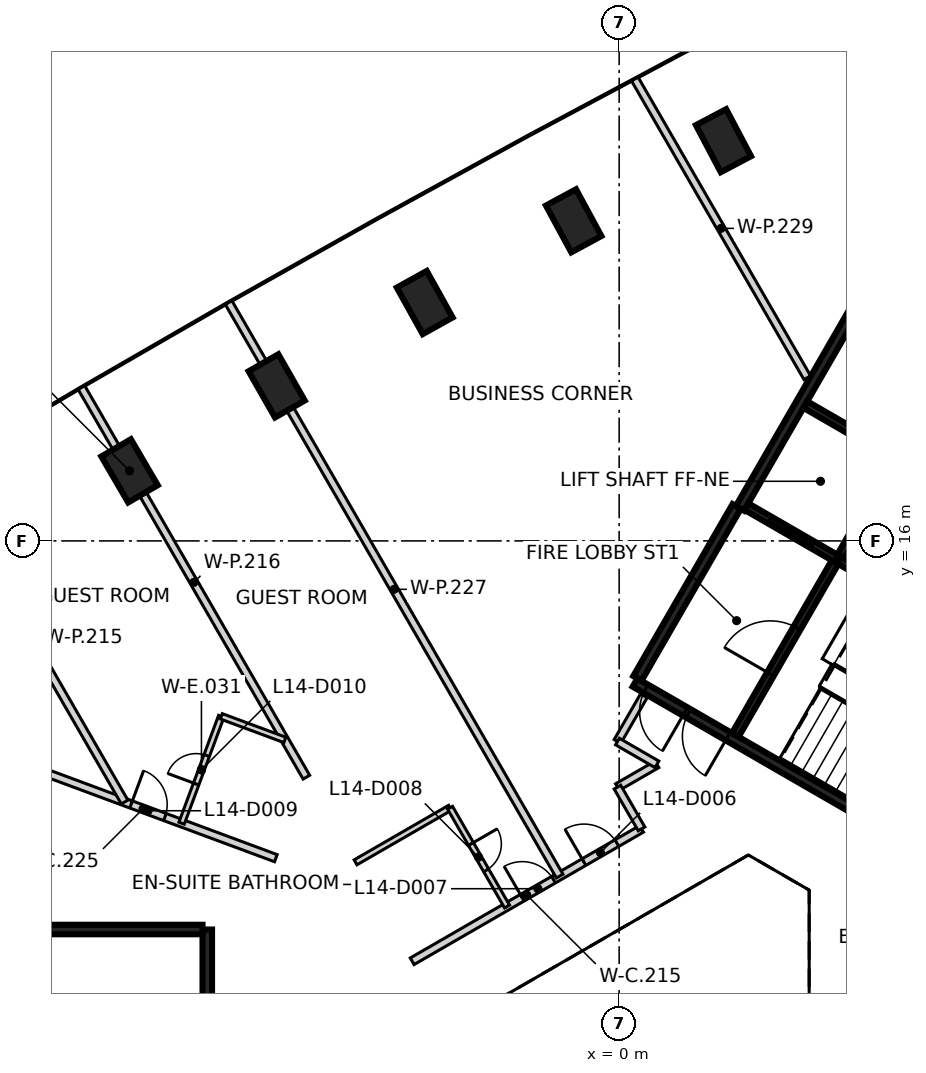
"""IFC4 building model, lengths in metres.
Left out: names, types, materials, properties, quantities, classifications, styles, units other than length and angle.
Written with IfcOpenShell. Run it as: python <this file> out.ifc"""

import sys

from ifc_helpers import new_model, si_unit, direction, frame, frame_2d, origin, origin_2d, place, context, subcontext, project, spatial, rectangle, extrude, element, fill, save


model = new_model("IFC4")
c1 = context("Model", 3, precision=1e-05, world=origin(), true_north=direction((0.0, 1.0)))
c2 = subcontext(c1, "Body", "Model", "MODEL_VIEW")
j1 = project(units=[si_unit("LENGTHUNIT", "METRE"), si_unit("PLANEANGLEUNIT", "RADIAN")], contexts=[c1])
p1 = place(None, origin())
s1 = spatial("IfcSite", under=j1, at=p1, CompositionType="ELEMENT")
p2 = place(p1, origin())
s2 = spatial("IfcBuilding", under=s1, at=p2, CompositionType="ELEMENT")
p3 = place(p2, frame((0.0, 0.0, 63.8)))
s3 = spatial("IfcBuildingStorey", under=s2, at=p3, CompositionType="ELEMENT", Elevation=63.8)
for number, where, z_axis, x_axis in (
    (1, (2.745, 26.531, -0.475), (0.0, 0.0, 1.0), (-0.467, 0.884, 0.0)),
    (2, (-1.197, 24.423, -0.475), (0.0, 0.0, 1.0), (-0.476, 0.879, 0.0)),
    (3, (-5.116, 22.272, -0.475), (0.0, 0.0, 1.0), (-0.486, 0.874, 0.0)),
    (4, (-9.011, 20.079, -0.475), (0.0, 0.0, 1.0), (-0.495, 0.869, 0.0)),
    (5, (-12.883, 17.844, -0.475), (0.0, 0.0, 1.0), (-0.505, 0.863, 0.0)),
):
    element("IfcColumn", number, at=place(p3, frame(where, z_axis=z_axis, x_axis=x_axis)), inside=s3, PredefinedType="COLUMN", context=c2, shape_type="SweptSolid", body=[
        extrude(rectangle(XDim=1.4, YDim=0.9, at=origin_2d()), origin(), (0.0, 0.0, 1.0), 3.6),
    ])
p4 = place(p3, frame((-10.837, 5.775, 0.0), z_axis=(0.0, 0.0, 1.0), x_axis=(0.0, -1.0, 0.0)))
e6 = element("IfcWall", 6, at=p4, inside=s3, PredefinedType="SHEAR", context=c2, shape_type="SweptSolid", body=[
    extrude(rectangle(XDim=11.55, YDim=0.25, at=frame_2d((5.775, 0.0))), origin(), (0.0, 0.0, 1.0), 3.125),
])
p5 = place(p4, frame((10.025, 0.0, 0.0)))
e7 = element("IfcOpeningElement", 7, at=p5, cuts=e6, PredefinedType="OPENING", context=c2, shape_type="SweptSolid", body=[
    extrude(rectangle(XDim=1.2, YDim=2.1, at=frame_2d((0.6, 1.05))), frame((0.0, 0.135, 0.0), z_axis=(0.0, -1.0, 0.0), x_axis=(1.0, 0.0, 0.0)), (0.0, 0.0, 1.0), 0.27),
])
p6 = place(p4, frame((8.725, 0.0, 0.0)))
e8 = element("IfcOpeningElement", 8, at=p6, cuts=e6, PredefinedType="OPENING", context=c2, shape_type="SweptSolid", body=[
    extrude(rectangle(XDim=1.2, YDim=2.1, at=frame_2d((0.6, 1.05))), frame((0.0, 0.135, 0.0), z_axis=(0.0, -1.0, 0.0), x_axis=(1.0, 0.0, 0.0)), (0.0, 0.0, 1.0), 0.27),
])
p7 = place(p3, frame((-16.472, 5.775, 0.0), z_axis=(0.0, 0.0, 1.0), x_axis=(1.0, 0.0, 0.0)))
e9 = element("IfcWall", 9, at=p7, inside=s3, PredefinedType="SHEAR", context=c2, shape_type="SweptSolid", body=[
    extrude(rectangle(XDim=5.51, YDim=0.25, at=frame_2d((2.755, 0.0))), origin(), (0.0, 0.0, 1.0), 3.125),
])
p8 = place(p3, frame((10.42, 6.498, 0.0), z_axis=(0.0, 0.0, 1.0), x_axis=(-0.866021906294, 0.500006057782, 0.0)))
e10 = element("IfcWall", 10, at=p8, inside=s3, PredefinedType="SHEAR", context=c2, shape_type="SweptSolid", body=[
    extrude(rectangle(XDim=11.55, YDim=0.25, at=frame_2d((5.775, 0.0))), origin(), (0.0, 0.0, 1.0), 3.125),
])
p9 = place(p8, frame((10.025, 0.0, 0.0)))
e11 = element("IfcOpeningElement", 11, at=p9, cuts=e10, PredefinedType="OPENING", context=c2, shape_type="SweptSolid", body=[
    extrude(rectangle(XDim=1.2, YDim=2.1, at=frame_2d((0.6, 1.05))), frame((0.0, 0.135, 0.0), z_axis=(0.0, -1.0, 0.0), x_axis=(1.0, 0.0, 0.0)), (0.0, 0.0, 1.0), 0.27),
])
p10 = place(p8, frame((8.725, 0.0, 0.0)))
e12 = element("IfcOpeningElement", 12, at=p10, cuts=e10, PredefinedType="OPENING", context=c2, shape_type="SweptSolid", body=[
    extrude(rectangle(XDim=1.2, YDim=2.1, at=frame_2d((0.6, 1.05))), frame((0.0, 0.135, 0.0), z_axis=(0.0, -1.0, 0.0), x_axis=(1.0, 0.0, 0.0)), (0.0, 0.0, 1.0), 0.27),
])
p11 = place(p3, frame((3.179, 16.856, 0.0), z_axis=(0.0, 0.0, 1.0), x_axis=(0.500004234368, 0.866022959057, 0.0)))
e13 = element("IfcWall", 13, at=p11, inside=s3, PredefinedType="SHEAR", context=c2, shape_type="SweptSolid", body=[
    extrude(rectangle(XDim=6.25, YDim=0.25, at=frame_2d((3.125, 0.0))), origin(), (0.0, 0.0, 1.0), 3.125),
])
p12 = place(p3, frame((0.48, 12.381, 0.0), z_axis=(0.0, 0.0, 1.0), x_axis=(0.49999885962, 0.866026062182, 0.0)))
e14 = element("IfcWall", 14, at=p12, inside=s3, PredefinedType="SHEAR", context=c2, shape_type="SweptSolid", body=[
    extrude(rectangle(XDim=5.225, YDim=0.25, at=frame_2d((2.612, 0.0))), origin(), (0.0, 0.0, 1.0), 3.125),
])
p13 = place(p3, frame((5.775, 15.502, 0.0), z_axis=(0.0, 0.0, 1.0), x_axis=(0.866020080793, -0.500009219579, 0.0)))
e15 = element("IfcWall", 15, at=p13, inside=s3, PredefinedType="SHEAR", context=c2, shape_type="SweptSolid", body=[
    extrude(rectangle(XDim=5.699, YDim=0.2, at=frame_2d((2.85, 0.0))), origin(), (0.0, 0.0, 1.0), 3.125),
])
p14 = place(p3, frame((3.057, 10.895, 0.0), z_axis=(0.0, 0.0, 1.0), x_axis=(0.499989418164, 0.866031513124, 0.0)))
e16 = element("IfcWall", 16, at=p14, inside=s3, PredefinedType="SHEAR", context=c2, shape_type="SweptSolid", body=[
    extrude(rectangle(XDim=5.251, YDim=0.2, at=frame_2d((2.625, 0.0))), origin(), (0.0, 0.0, 1.0), 3.125),
])
p15 = place(p14, frame((1.849, 0.0, 0.0)))
e17 = element("IfcOpeningElement", 17, at=p15, cuts=e16, PredefinedType="OPENING", context=c2, shape_type="SweptSolid", body=[
    extrude(rectangle(XDim=1.4, YDim=2.1, at=frame_2d((0.7, 1.05))), frame((0.0, 0.11, 0.0), z_axis=(0.0, -1.0, 0.0), x_axis=(1.0, 0.0, 0.0)), (0.0, 0.0, 1.0), 0.22),
])
p16 = place(p3, frame((7.199, 17.97, 0.0), z_axis=(0.0, 0.0, 1.0), x_axis=(-0.499968400327, -0.866043647095, 0.0)))
e18 = element("IfcWall", 18, at=p16, inside=s3, PredefinedType="SHEAR", context=c2, shape_type="SweptSolid", body=[
    extrude(rectangle(XDim=2.75, YDim=0.2, at=frame_2d((1.375, 0.0))), origin(), (0.0, 0.0, 1.0), 3.125),
])
p17 = place(p3, frame((5.725, 15.531, 0.0), z_axis=(0.0, 0.0, 1.0), x_axis=(-0.866037306777, 0.499979382845, 0.0)))
e19 = element("IfcWall", 19, at=p17, inside=s3, PredefinedType="SHEAR", context=c2, shape_type="SweptSolid", body=[
    extrude(rectangle(XDim=2.742, YDim=0.2, at=frame_2d((1.371, 0.0))), origin(), (0.0, 0.0, 1.0), 3.125),
])
p18 = place(p17, frame((0.743, 0.0, 0.0)))
e20 = element("IfcOpeningElement", 20, at=p18, cuts=e19, PredefinedType="OPENING", context=c2, shape_type="SweptSolid", body=[
    extrude(rectangle(XDim=1.3, YDim=2.1, at=frame_2d((0.65, 1.05))), frame((0.0, 0.11, 0.0), z_axis=(0.0, -1.0, 0.0), x_axis=(1.0, 0.0, 0.0)), (0.0, 0.0, 1.0), 0.22),
])
p19 = place(p3, frame((4.901, 19.586, 0.0), z_axis=(0.0, 0.0, 1.0), x_axis=(0.866022890907, -0.500004352405, 0.0)))
e21 = element("IfcWall", 21, at=p19, inside=s3, PredefinedType="SHEAR", context=c2, shape_type="SweptSolid", body=[
    extrude(rectangle(XDim=2.799, YDim=0.2, at=frame_2d((1.399, 0.0))), origin(), (0.0, 0.0, 1.0), 3.125),
])
p20 = place(p3, frame((-16.026, 10.247, 0.0), z_axis=(0.0, 0.0, 1.0), x_axis=(0.937540909117, -0.347875040397, 0.0)))
e22 = element("IfcWall", 22, at=p20, inside=s3, PredefinedType="PARTITIONING", context=c2, shape_type="SweptSolid", body=[
    extrude(rectangle(XDim=7.459, YDim=0.2, at=frame_2d((3.729, 0.0))), origin(), (0.0, 0.0, 1.0), 3.125),
])
p21 = place(p20, frame((3.396, 0.0, 0.0)))
e23 = element("IfcOpeningElement", 23, at=p21, cuts=e22, PredefinedType="OPENING", context=c2, shape_type="SweptSolid", body=[
    extrude(rectangle(XDim=0.95, YDim=2.1, at=frame_2d((0.475, 1.05))), frame((0.0, 0.11, 0.0), z_axis=(0.0, -1.0, 0.0), x_axis=(1.0, 0.0, 0.0)), (0.0, 0.0, 1.0), 0.22),
])
p22 = place(p3, frame((-5.446, 4.94, 0.0), z_axis=(0.0, 0.0, 1.0), x_axis=(0.866096332545, 0.499877127655, 0.0)))
e24 = element("IfcWall", 24, at=p22, inside=s3, PredefinedType="PARTITIONING", context=c2, shape_type="SweptSolid", body=[
    extrude(rectangle(XDim=6.969, YDim=0.2, at=frame_2d((3.484, 0.0))), origin(), (0.0, 0.0, 1.0), 3.125),
])
p23 = place(p22, frame((5.219, 0.0, 0.0)))
e25 = element("IfcOpeningElement", 25, at=p23, cuts=e24, PredefinedType="OPENING", context=c2, shape_type="SweptSolid", body=[
    extrude(rectangle(XDim=1.0, YDim=2.1, at=frame_2d((0.5, 1.05))), frame((0.0, 0.11, 0.0), z_axis=(0.0, -1.0, 0.0), x_axis=(1.0, 0.0, 0.0)), (0.0, 0.0, 1.0), 0.22),
])
p24 = place(p22, frame((3.344, 0.0, 0.0)))
e26 = element("IfcOpeningElement", 26, at=p24, cuts=e24, PredefinedType="OPENING", context=c2, shape_type="SweptSolid", body=[
    extrude(rectangle(XDim=0.95, YDim=2.1, at=frame_2d((0.475, 1.05))), frame((0.0, 0.11, 0.0), z_axis=(0.0, -1.0, 0.0), x_axis=(1.0, 0.0, 0.0)), (0.0, 0.0, 1.0), 0.22),
])
p25 = place(p3, frame((-0.045, 9.522, 0.0), z_axis=(0.0, 0.0, 1.0), x_axis=(0.86625675314, 0.499599076899, 0.0)))
e27 = element("IfcWall", 27, at=p25, inside=s3, PredefinedType="PARTITIONING", context=c2, shape_type="SweptSolid", body=[
    extrude(rectangle(XDim=1.199, YDim=0.2, at=frame_2d((0.6, 0.0))), origin(), (0.0, 0.0, 1.0), 3.125),
])
p26 = place(p3, frame((-0.045, 10.722, 0.0), z_axis=(0.0, 0.0, 1.0), x_axis=(0.500107785535, 0.865963164833, 0.0)))
e28 = element("IfcWall", 28, at=p26, inside=s3, PredefinedType="PARTITIONING", context=c2, shape_type="SweptSolid", body=[
    extrude(rectangle(XDim=1.389, YDim=0.2, at=frame_2d((0.695, 0.0))), origin(), (0.0, 0.0, 1.0), 3.125),
])
p27 = place(p3, frame((-0.045, 9.521, 0.0), z_axis=(0.0, 0.0, 1.0), x_axis=(0.500094716449, -0.865970712311, 0.0)))
e29 = element("IfcWall", 29, at=p27, inside=s3, PredefinedType="PARTITIONING", context=c2, shape_type="SweptSolid", body=[
    extrude(rectangle(XDim=1.268, YDim=0.2, at=frame_2d((0.634, 0.0))), origin(), (0.0, 0.0, 1.0), 3.125),
])
p28 = place(p3, frame((-0.045, 10.721, 0.0), z_axis=(0.0, 0.0, 1.0), x_axis=(0.865992388649, -0.500057179532, 0.0)))
e30 = element("IfcWall", 30, at=p28, inside=s3, PredefinedType="PARTITIONING", context=c2, shape_type="SweptSolid", body=[
    extrude(rectangle(XDim=1.199, YDim=0.2, at=frame_2d((0.6, 0.0))), origin(), (0.0, 0.0, 1.0), 3.125),
])
p29 = place(p3, frame((-17.996, 17.758, 0.0), z_axis=(0.0, 0.0, 1.0), x_axis=(0.500046945013, -0.865998298372, 0.0)))
e31 = element("IfcWall", 31, at=p29, inside=s3, PredefinedType="PARTITIONING", context=c2, shape_type="SweptSolid", body=[
    extrude(rectangle(XDim=9.964, YDim=0.2, at=frame_2d((4.982, 0.0))), origin(), (0.0, 0.0, 1.0), 3.125),
])
p30 = place(p3, frame((-14.149, 20.035, 0.0), z_axis=(0.0, 0.0, 1.0), x_axis=(0.500022967158, -0.866012143284, 0.0)))
e32 = element("IfcWall", 32, at=p30, inside=s3, PredefinedType="PARTITIONING", context=c2, shape_type="SweptSolid", body=[
    extrude(rectangle(XDim=11.838, YDim=0.2, at=frame_2d((5.919, 0.0))), origin(), (0.0, 0.0, 1.0), 3.125),
])
p31 = place(p3, frame((-10.276, 22.271, 0.0), z_axis=(0.0, 0.0, 1.0), x_axis=(0.499975954304, -0.866039286129, 0.0)))
e33 = element("IfcWall", 33, at=p31, inside=s3, PredefinedType="PARTITIONING", context=c2, shape_type="SweptSolid", body=[
    extrude(rectangle(XDim=17.424, YDim=0.2, at=frame_2d((8.712, 0.0))), origin(), (0.0, 0.0, 1.0), 3.125),
])
p32 = place(p3, frame((0.412, 28.153, 0.0), z_axis=(0.0, 0.0, 1.0), x_axis=(0.500039143415, -0.866002803143, 0.0)))
e34 = element("IfcWall", 34, at=p32, inside=s3, PredefinedType="PARTITIONING", context=c2, shape_type="SweptSolid", body=[
    extrude(rectangle(XDim=9.075, YDim=0.2, at=frame_2d((4.538, 0.0))), origin(), (0.0, 0.0, 1.0), 2.225),
])
p33 = place(p3, frame((-11.513, 8.572, 0.0), z_axis=(0.0, 0.0, 1.0), x_axis=(0.347929104424, 0.937520846859, 0.0)))
e35 = element("IfcWall", 35, at=p33, inside=s3, PredefinedType="PARTITIONING", context=c2, shape_type="SweptSolid", body=[
    extrude(rectangle(XDim=3.0, YDim=0.15, at=frame_2d((1.5, 0.0))), origin(), (0.0, 0.0, 1.0), 3.125),
])
p34 = place(p33, frame((1.1, 0.0, 0.0)))
e36 = element("IfcOpeningElement", 36, at=p34, cuts=e35, PredefinedType="OPENING", context=c2, shape_type="SweptSolid", body=[
    extrude(rectangle(XDim=0.8, YDim=2.1, at=frame_2d((0.4, 1.05))), frame((0.0, 0.085, 0.0), z_axis=(0.0, -1.0, 0.0), x_axis=(1.0, 0.0, 0.0)), (0.0, 0.0, 1.0), 0.17),
])
p35 = place(p3, frame((-10.469, 11.385, 0.0), z_axis=(0.0, 0.0, 1.0), x_axis=(0.937487768635, -0.348018223173, 0.0)))
e37 = element("IfcWall", 37, at=p35, inside=s3, PredefinedType="PARTITIONING", context=c2, shape_type="SweptSolid", body=[
    extrude(rectangle(XDim=1.785, YDim=0.15, at=frame_2d((0.892, 0.0))), origin(), (0.0, 0.0, 1.0), 3.125),
])
p36 = place(p3, frame((-6.936, 7.543, 0.0), z_axis=(0.0, 0.0, 1.0), x_axis=(0.866153027342, 0.499778884334, 0.0)))
e38 = element("IfcWall", 38, at=p36, inside=s3, PredefinedType="PARTITIONING", context=c2, shape_type="SweptSolid", body=[
    extrude(rectangle(XDim=2.871, YDim=0.15, at=frame_2d((1.436, 0.0))), origin(), (0.0, 0.0, 1.0), 3.125),
])
p37 = place(p3, frame((-4.449, 8.978, 0.0), z_axis=(0.0, 0.0, 1.0), x_axis=(0.499745940409, -0.866172035478, 0.0)))
e39 = element("IfcWall", 39, at=p37, inside=s3, PredefinedType="PARTITIONING", context=c2, shape_type="SweptSolid", body=[
    extrude(rectangle(XDim=3.0, YDim=0.15, at=frame_2d((1.5, 0.0))), origin(), (0.0, 0.0, 1.0), 3.125),
])
p38 = place(p37, frame((1.1, 0.0, 0.0)))
e40 = element("IfcOpeningElement", 40, at=p38, cuts=e39, PredefinedType="OPENING", context=c2, shape_type="SweptSolid", body=[
    extrude(rectangle(XDim=0.8, YDim=2.1, at=frame_2d((0.4, 1.05))), frame((0.0, 0.085, 0.0), z_axis=(0.0, -1.0, 0.0), x_axis=(1.0, 0.0, 0.0)), (0.0, 0.0, 1.0), 0.17),
])
p39 = place(p18, origin())
e41 = element("IfcDoor", 41, at=p39, inside=s3, OperationType="SLIDING_TO_RIGHT", PredefinedType="DOOR", context=c2, shape_type="SweptSolid", body=[
    extrude(rectangle(XDim=1.3, YDim=2.1, at=frame_2d((0.65, 1.05))), frame((0.0, 0.025, 0.0), z_axis=(0.0, -1.0, 0.0), x_axis=(1.0, 0.0, 0.0)), (0.0, 0.0, 1.0), 0.05),
])
fill(e20, e41)
p40 = place(p9, origin())
e42 = element("IfcDoor", 42, at=p40, inside=s3, OperationType="SINGLE_SWING_LEFT", PredefinedType="DOOR", context=c2, shape_type="SweptSolid", body=[
    extrude(rectangle(XDim=1.2, YDim=2.1, at=frame_2d((0.6, 1.05))), frame((0.0, 0.025, 0.0), z_axis=(0.0, -1.0, 0.0), x_axis=(1.0, 0.0, 0.0)), (0.0, 0.0, 1.0), 0.05),
])
fill(e11, e42)
p41 = place(p10, origin())
e43 = element("IfcDoor", 43, at=p41, inside=s3, OperationType="SINGLE_SWING_RIGHT", PredefinedType="DOOR", context=c2, shape_type="SweptSolid", body=[
    extrude(rectangle(XDim=1.2, YDim=2.1, at=frame_2d((0.6, 1.05))), frame((0.0, 0.025, 0.0), z_axis=(0.0, -1.0, 0.0), x_axis=(1.0, 0.0, 0.0)), (0.0, 0.0, 1.0), 0.05),
])
fill(e12, e43)
p42 = place(p15, origin())
e44 = element("IfcDoor", 44, at=p42, inside=s3, OperationType="SINGLE_SWING_RIGHT", PredefinedType="DOOR", context=c2, shape_type="SweptSolid", body=[
    extrude(rectangle(XDim=1.4, YDim=2.1, at=frame_2d((0.7, 1.05))), frame((0.0, 0.025, 0.0), z_axis=(0.0, -1.0, 0.0), x_axis=(1.0, 0.0, 0.0)), (0.0, 0.0, 1.0), 0.05),
])
fill(e17, e44)
p43 = place(p23, origin())
e45 = element("IfcDoor", 45, at=p43, inside=s3, OperationType="SINGLE_SWING_LEFT", PredefinedType="DOOR", context=c2, shape_type="SweptSolid", body=[
    extrude(rectangle(XDim=1.0, YDim=2.1, at=frame_2d((0.5, 1.05))), frame((0.0, 0.025, 0.0), z_axis=(0.0, -1.0, 0.0), x_axis=(1.0, 0.0, 0.0)), (0.0, 0.0, 1.0), 0.05),
])
fill(e25, e45)
p44 = place(p24, origin())
e46 = element("IfcDoor", 46, at=p44, inside=s3, OperationType="SINGLE_SWING_LEFT", PredefinedType="DOOR", context=c2, shape_type="SweptSolid", body=[
    extrude(rectangle(XDim=0.95, YDim=2.1, at=frame_2d((0.475, 1.05))), frame((0.0, 0.025, 0.0), z_axis=(0.0, -1.0, 0.0), x_axis=(1.0, 0.0, 0.0)), (0.0, 0.0, 1.0), 0.05),
])
fill(e26, e46)
p45 = place(p38, frame((0.8, 0.0, 0.0), z_axis=(0.0, 0.0, 1.0), x_axis=(-1.0, 0.0, 0.0)))
e47 = element("IfcDoor", 47, at=p45, inside=s3, OperationType="SINGLE_SWING_LEFT", PredefinedType="DOOR", context=c2, shape_type="SweptSolid", body=[
    extrude(rectangle(XDim=0.8, YDim=2.1, at=frame_2d((0.4, 1.05))), frame((0.0, 0.025, 0.0), z_axis=(0.0, -1.0, 0.0), x_axis=(1.0, 0.0, 0.0)), (0.0, 0.0, 1.0), 0.05),
])
fill(e40, e47)
p46 = place(p21, origin())
e48 = element("IfcDoor", 48, at=p46, inside=s3, OperationType="SINGLE_SWING_LEFT", PredefinedType="DOOR", context=c2, shape_type="SweptSolid", body=[
    extrude(rectangle(XDim=0.95, YDim=2.1, at=frame_2d((0.475, 1.05))), frame((0.0, 0.025, 0.0), z_axis=(0.0, -1.0, 0.0), x_axis=(1.0, 0.0, 0.0)), (0.0, 0.0, 1.0), 0.05),
])
fill(e23, e48)
p47 = place(p34, origin())
e49 = element("IfcDoor", 49, at=p47, inside=s3, OperationType="SINGLE_SWING_LEFT", PredefinedType="DOOR", context=c2, shape_type="SweptSolid", body=[
    extrude(rectangle(XDim=0.8, YDim=2.1, at=frame_2d((0.4, 1.05))), frame((0.0, 0.025, 0.0), z_axis=(0.0, -1.0, 0.0), x_axis=(1.0, 0.0, 0.0)), (0.0, 0.0, 1.0), 0.05),
])
fill(e36, e49)
save(model, sys.argv[1])
